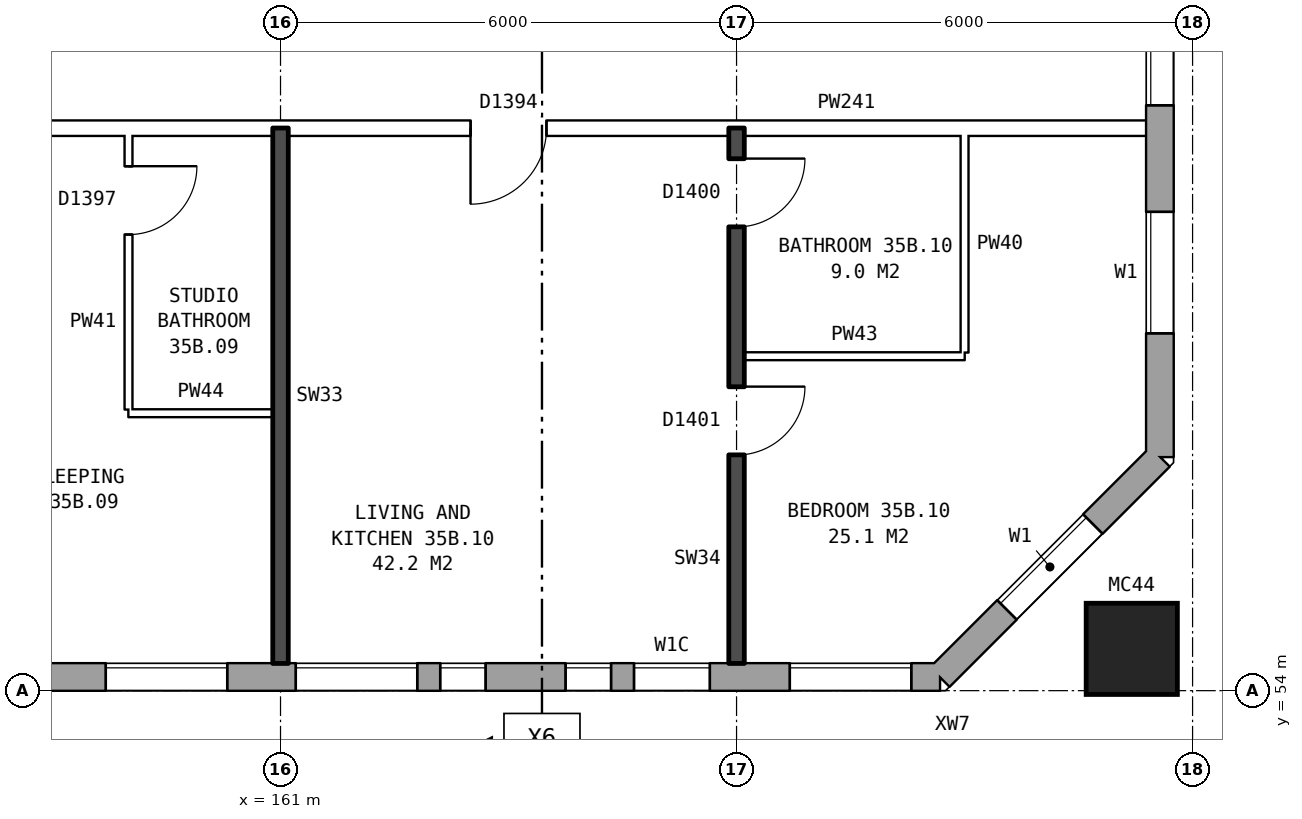
"""IFC4 building model, lengths in metres.
Left out: names, types, materials, properties, quantities, classifications, styles, units other than length and angle.
Written with IfcOpenShell. Run it as: python <this file> out.ifc"""

import sys

from ifc_helpers import new_model, si_unit, direction, frame, frame_2d, origin, origin_2d, place, context, subcontext, project, spatial, rectangle, hollow_rectangle, extrude, element, fill, save


model = new_model("IFC4")
c1 = context("Model", 3, precision=1e-05, world=origin(), true_north=direction((0.0, 1.0)))
c2 = subcontext(c1, "Body", "Model", "MODEL_VIEW")
j1 = project(units=[si_unit("LENGTHUNIT", "METRE"), si_unit("PLANEANGLEUNIT", "RADIAN")], contexts=[c1])
p1 = place(None, origin())
s1 = spatial("IfcSite", under=j1, at=p1, CompositionType="ELEMENT")
p2 = place(p1, origin())
s2 = spatial("IfcBuilding", under=s1, at=p2, CompositionType="ELEMENT")
p3 = place(p2, frame((0.0, 0.0, 126.8)))
s3 = spatial("IfcBuildingStorey", under=s2, at=p3, CompositionType="ELEMENT", Elevation=126.8)
p4 = place(p3, frame((172.2, 54.55, 0.0), z_axis=(0.0, 0.0, 1.0), x_axis=(1.0, 0.0, 0.0)))
e1 = element("IfcColumn", 1, at=p4, inside=s3, PredefinedType="COLUMN", context=c2, shape_type="SweptSolid", body=[
    extrude(hollow_rectangle(XDim=1.2, YDim=1.2, WallThickness=0.065, at=origin_2d()), origin(), (0.0, 0.0, 1.0), 3.1),
])
p5 = place(p3, frame((134.075, 54.18, 0.0), z_axis=(0.0, 0.0, 1.0), x_axis=(1.0, 0.0, 0.0)))
e2 = element("IfcWall", 2, at=p5, inside=s3, PredefinedType="STANDARD", context=c2, shape_type="SweptSolid", body=[
    extrude(rectangle(XDim=35.601, YDim=0.36, at=frame_2d((17.8, 0.0))), origin(), (0.0, 0.0, 1.0), 2.85),
])
p6 = place(p5, frame((0.625, 0.0, 0.8)))
e3 = element("IfcOpeningElement", 3, at=p6, cuts=e2, PredefinedType="OPENING", context=c2, shape_type="SweptSolid", body=[
    extrude(rectangle(XDim=1.6, YDim=1.8, at=frame_2d((0.8, 0.9))), frame((0.0, 0.19, 0.0), z_axis=(0.0, -1.0, 0.0), x_axis=(1.0, 0.0, 0.0)), (0.0, 0.0, 1.0), 0.38),
])
p7 = place(p5, frame((3.125, 0.0, 0.8)))
e4 = element("IfcOpeningElement", 4, at=p7, cuts=e2, PredefinedType="OPENING", context=c2, shape_type="SweptSolid", body=[
    extrude(rectangle(XDim=0.8, YDim=1.8, at=frame_2d((0.4, 0.9))), frame((0.0, 0.19, 0.0), z_axis=(0.0, -1.0, 0.0), x_axis=(1.0, 0.0, 0.0)), (0.0, 0.0, 1.0), 0.38),
])
p8 = place(p5, frame((6.625, 0.0, 0.8)))
e5 = element("IfcOpeningElement", 5, at=p8, cuts=e2, PredefinedType="OPENING", context=c2, shape_type="SweptSolid", body=[
    extrude(rectangle(XDim=1.6, YDim=1.8, at=frame_2d((0.8, 0.9))), frame((0.0, 0.19, 0.0), z_axis=(0.0, -1.0, 0.0), x_axis=(1.0, 0.0, 0.0)), (0.0, 0.0, 1.0), 0.38),
])
p9 = place(p5, frame((9.625, 0.0, 0.8)))
e6 = element("IfcOpeningElement", 6, at=p9, cuts=e2, PredefinedType="OPENING", context=c2, shape_type="SweptSolid", body=[
    extrude(rectangle(XDim=1.6, YDim=1.8, at=frame_2d((0.8, 0.9))), frame((0.0, 0.19, 0.0), z_axis=(0.0, -1.0, 0.0), x_axis=(1.0, 0.0, 0.0)), (0.0, 0.0, 1.0), 0.38),
])
p10 = place(p5, frame((12.625, 0.0, 0.8)))
e7 = element("IfcOpeningElement", 7, at=p10, cuts=e2, PredefinedType="OPENING", context=c2, shape_type="SweptSolid", body=[
    extrude(rectangle(XDim=1.6, YDim=1.8, at=frame_2d((0.8, 0.9))), frame((0.0, 0.19, 0.0), z_axis=(0.0, -1.0, 0.0), x_axis=(1.0, 0.0, 0.0)), (0.0, 0.0, 1.0), 0.38),
])
p11 = place(p5, frame((15.625, 0.0, 0.8)))
e8 = element("IfcOpeningElement", 8, at=p11, cuts=e2, PredefinedType="OPENING", context=c2, shape_type="SweptSolid", body=[
    extrude(rectangle(XDim=1.6, YDim=1.8, at=frame_2d((0.8, 0.9))), frame((0.0, 0.19, 0.0), z_axis=(0.0, -1.0, 0.0), x_axis=(1.0, 0.0, 0.0)), (0.0, 0.0, 1.0), 0.38),
])
p12 = place(p5, frame((18.625, 0.0, 0.8)))
e9 = element("IfcOpeningElement", 9, at=p12, cuts=e2, PredefinedType="OPENING", context=c2, shape_type="SweptSolid", body=[
    extrude(rectangle(XDim=1.6, YDim=1.8, at=frame_2d((0.8, 0.9))), frame((0.0, 0.19, 0.0), z_axis=(0.0, -1.0, 0.0), x_axis=(1.0, 0.0, 0.0)), (0.0, 0.0, 1.0), 0.38),
])
p13 = place(p5, frame((21.625, 0.0, 0.8)))
e10 = element("IfcOpeningElement", 10, at=p13, cuts=e2, PredefinedType="OPENING", context=c2, shape_type="SweptSolid", body=[
    extrude(rectangle(XDim=1.6, YDim=1.8, at=frame_2d((0.8, 0.9))), frame((0.0, 0.19, 0.0), z_axis=(0.0, -1.0, 0.0), x_axis=(1.0, 0.0, 0.0)), (0.0, 0.0, 1.0), 0.38),
])
p14 = place(p5, frame((24.625, 0.0, 0.8)))
e11 = element("IfcOpeningElement", 11, at=p14, cuts=e2, PredefinedType="OPENING", context=c2, shape_type="SweptSolid", body=[
    extrude(rectangle(XDim=1.6, YDim=1.8, at=frame_2d((0.8, 0.9))), frame((0.0, 0.19, 0.0), z_axis=(0.0, -1.0, 0.0), x_axis=(1.0, 0.0, 0.0)), (0.0, 0.0, 1.0), 0.38),
])
p15 = place(p5, frame((27.125, 0.0, 0.8)))
e12 = element("IfcOpeningElement", 12, at=p15, cuts=e2, PredefinedType="OPENING", context=c2, shape_type="SweptSolid", body=[
    extrude(rectangle(XDim=1.6, YDim=1.8, at=frame_2d((0.8, 0.9))), frame((0.0, 0.19, 0.0), z_axis=(0.0, -1.0, 0.0), x_axis=(1.0, 0.0, 0.0)), (0.0, 0.0, 1.0), 0.38),
])
p16 = place(p5, frame((29.025, 0.0, 0.8)))
e13 = element("IfcOpeningElement", 13, at=p16, cuts=e2, PredefinedType="OPENING", context=c2, shape_type="SweptSolid", body=[
    extrude(rectangle(XDim=0.6, YDim=0.9, at=frame_2d((0.3, 0.45))), frame((0.0, 0.19, 0.0), z_axis=(0.0, -1.0, 0.0), x_axis=(1.0, 0.0, 0.0)), (0.0, 0.0, 1.0), 0.38),
])
p17 = place(p5, frame((33.625, 0.0, 0.8)))
e14 = element("IfcOpeningElement", 14, at=p17, cuts=e2, PredefinedType="OPENING", context=c2, shape_type="SweptSolid", body=[
    extrude(rectangle(XDim=1.6, YDim=1.8, at=frame_2d((0.8, 0.9))), frame((0.0, 0.19, 0.0), z_axis=(0.0, -1.0, 0.0), x_axis=(1.0, 0.0, 0.0)), (0.0, 0.0, 1.0), 0.38),
])
p18 = place(p5, frame((4.225, 0.0, 1.6)))
e15 = element("IfcOpeningElement", 15, at=p18, cuts=e2, PredefinedType="OPENING", context=c2, shape_type="SweptSolid", body=[
    extrude(rectangle(XDim=0.6, YDim=0.9, at=frame_2d((0.3, 0.45))), frame((0.0, 0.19, 0.0), z_axis=(0.0, -1.0, 0.0), x_axis=(1.0, 0.0, 0.0)), (0.0, 0.0, 1.0), 0.38),
])
p19 = place(p5, frame((30.675, 0.0, 1.7)))
e16 = element("IfcOpeningElement", 16, at=p19, cuts=e2, PredefinedType="OPENING", context=c2, shape_type="SweptSolid", body=[
    extrude(rectangle(XDim=0.6, YDim=0.9, at=frame_2d((0.3, 0.45))), frame((0.0, 0.19, 0.0), z_axis=(0.0, -1.0, 0.0), x_axis=(1.0, 0.0, 0.0)), (0.0, 0.0, 1.0), 0.38),
])
p20 = place(p5, frame((31.575, 0.0, 0.8)))
e17 = element("IfcOpeningElement", 17, at=p20, cuts=e2, PredefinedType="OPENING", context=c2, shape_type="SweptSolid", body=[
    extrude(rectangle(XDim=1.0, YDim=1.8, at=frame_2d((0.5, 0.9))), frame((0.0, 0.19, 0.0), z_axis=(0.0, -1.0, 0.0), x_axis=(1.0, 0.0, 0.0)), (0.0, 0.0, 1.0), 0.38),
])
p21 = place(p3, frame((169.675, 54.18, 0.0), z_axis=(0.0, 0.0, 1.0), x_axis=(0.707106781187, 0.707106781187, 0.0)))
e18 = element("IfcWall", 18, at=p21, inside=s3, PredefinedType="STANDARD", context=c2, shape_type="SweptSolid", body=[
    extrude(rectangle(XDim=4.094, YDim=0.36, at=frame_2d((2.047, 0.0))), origin(), (0.0, 0.0, 1.0), 2.85),
])
p22 = place(p21, frame((1.247, 0.0, 0.8)))
e19 = element("IfcOpeningElement", 19, at=p22, cuts=e18, PredefinedType="OPENING", context=c2, shape_type="SweptSolid", body=[
    extrude(rectangle(XDim=1.6, YDim=1.8, at=frame_2d((0.8, 0.9))), frame((0.0, 0.19, 0.0), z_axis=(0.0, -1.0, 0.0), x_axis=(1.0, 0.0, 0.0)), (0.0, 0.0, 1.0), 0.38),
])
p23 = place(p3, frame((172.57, 57.075, 0.0), z_axis=(0.0, 0.0, 1.0), x_axis=(0.0, 1.0, 0.0)))
e20 = element("IfcWall", 20, at=p23, inside=s3, PredefinedType="STANDARD", context=c2, shape_type="SweptSolid", body=[
    extrude(rectangle(XDim=25.851, YDim=0.36, at=frame_2d((12.925, 0.0))), origin(), (0.0, 0.0, 1.0), 2.85),
])
p24 = place(p23, frame((1.625, 0.0, 0.8)))
e21 = element("IfcOpeningElement", 21, at=p24, cuts=e20, PredefinedType="OPENING", context=c2, shape_type="SweptSolid", body=[
    extrude(rectangle(XDim=1.6, YDim=1.8, at=frame_2d((0.8, 0.9))), frame((0.0, 0.19, 0.0), z_axis=(0.0, -1.0, 0.0), x_axis=(1.0, 0.0, 0.0)), (0.0, 0.0, 1.0), 0.38),
])
p25 = place(p23, frame((4.625, 0.0, 0.8)))
e22 = element("IfcOpeningElement", 22, at=p25, cuts=e20, PredefinedType="OPENING", context=c2, shape_type="SweptSolid", body=[
    extrude(rectangle(XDim=1.6, YDim=1.8, at=frame_2d((0.8, 0.9))), frame((0.0, 0.19, 0.0), z_axis=(0.0, -1.0, 0.0), x_axis=(1.0, 0.0, 0.0)), (0.0, 0.0, 1.0), 0.38),
])
p26 = place(p23, frame((6.525, 0.0, 0.8)))
e23 = element("IfcOpeningElement", 23, at=p26, cuts=e20, PredefinedType="OPENING", context=c2, shape_type="SweptSolid", body=[
    extrude(rectangle(XDim=1.2, YDim=1.8, at=frame_2d((0.6, 0.9))), frame((0.0, 0.19, 0.0), z_axis=(0.0, -1.0, 0.0), x_axis=(1.0, 0.0, 0.0)), (0.0, 0.0, 1.0), 0.38),
])
p27 = place(p23, frame((8.025, 0.0, 1.6)))
e24 = element("IfcOpeningElement", 24, at=p27, cuts=e20, PredefinedType="OPENING", context=c2, shape_type="SweptSolid", body=[
    extrude(rectangle(XDim=1.0, YDim=0.9, at=frame_2d((0.5, 0.45))), frame((0.0, 0.19, 0.0), z_axis=(0.0, -1.0, 0.0), x_axis=(1.0, 0.0, 0.0)), (0.0, 0.0, 1.0), 0.38),
])
p28 = place(p23, frame((10.075, 0.0, 0.8)))
e25 = element("IfcOpeningElement", 25, at=p28, cuts=e20, PredefinedType="OPENING", context=c2, shape_type="SweptSolid", body=[
    extrude(rectangle(XDim=1.0, YDim=0.9, at=frame_2d((0.5, 0.45))), frame((0.0, 0.19, 0.0), z_axis=(0.0, -1.0, 0.0), x_axis=(1.0, 0.0, 0.0)), (0.0, 0.0, 1.0), 0.38),
])
p29 = place(p23, frame((11.375, 0.0, 0.8)))
e26 = element("IfcOpeningElement", 26, at=p29, cuts=e20, PredefinedType="OPENING", context=c2, shape_type="SweptSolid", body=[
    extrude(rectangle(XDim=1.2, YDim=1.8, at=frame_2d((0.6, 0.9))), frame((0.0, 0.19, 0.0), z_axis=(0.0, -1.0, 0.0), x_axis=(1.0, 0.0, 0.0)), (0.0, 0.0, 1.0), 0.38),
])
p30 = place(p23, frame((19.625, 0.0, 0.8)))
e27 = element("IfcOpeningElement", 27, at=p30, cuts=e20, PredefinedType="OPENING", context=c2, shape_type="SweptSolid", body=[
    extrude(rectangle(XDim=1.6, YDim=1.8, at=frame_2d((0.8, 0.9))), frame((0.0, 0.19, 0.0), z_axis=(0.0, -1.0, 0.0), x_axis=(1.0, 0.0, 0.0)), (0.0, 0.0, 1.0), 0.38),
])
p31 = place(p23, frame((22.625, 0.0, 0.8)))
e28 = element("IfcOpeningElement", 28, at=p31, cuts=e20, PredefinedType="OPENING", context=c2, shape_type="SweptSolid", body=[
    extrude(rectangle(XDim=1.6, YDim=1.8, at=frame_2d((0.8, 0.9))), frame((0.0, 0.19, 0.0), z_axis=(0.0, -1.0, 0.0), x_axis=(1.0, 0.0, 0.0)), (0.0, 0.0, 1.0), 0.38),
])
p32 = place(p23, frame((12.875, 0.0, 0.8)))
e29 = element("IfcOpeningElement", 29, at=p32, cuts=e20, PredefinedType="OPENING", context=c2, shape_type="SweptSolid", body=[
    extrude(rectangle(XDim=1.6, YDim=1.8, at=frame_2d((0.8, 0.9))), frame((0.0, 0.19, 0.0), z_axis=(0.0, -1.0, 0.0), x_axis=(1.0, 0.0, 0.0)), (0.0, 0.0, 1.0), 0.38),
])
p33 = place(p23, frame((14.775, 0.0, 0.8)))
e30 = element("IfcOpeningElement", 30, at=p33, cuts=e20, PredefinedType="OPENING", context=c2, shape_type="SweptSolid", body=[
    extrude(rectangle(XDim=1.0, YDim=0.9, at=frame_2d((0.5, 0.45))), frame((0.0, 0.19, 0.0), z_axis=(0.0, -1.0, 0.0), x_axis=(1.0, 0.0, 0.0)), (0.0, 0.0, 1.0), 0.38),
])
p34 = place(p23, frame((16.675, 0.0, 1.7)))
e31 = element("IfcOpeningElement", 31, at=p34, cuts=e20, PredefinedType="OPENING", context=c2, shape_type="SweptSolid", body=[
    extrude(rectangle(XDim=1.0, YDim=0.9, at=frame_2d((0.5, 0.45))), frame((0.0, 0.19, 0.0), z_axis=(0.0, -1.0, 0.0), x_axis=(1.0, 0.0, 0.0)), (0.0, 0.0, 1.0), 0.38),
])
p35 = place(p23, frame((17.975, 0.0, 0.8)))
e32 = element("IfcOpeningElement", 32, at=p35, cuts=e20, PredefinedType="OPENING", context=c2, shape_type="SweptSolid", body=[
    extrude(rectangle(XDim=1.2, YDim=1.8, at=frame_2d((0.6, 0.9))), frame((0.0, 0.19, 0.0), z_axis=(0.0, -1.0, 0.0), x_axis=(1.0, 0.0, 0.0)), (0.0, 0.0, 1.0), 0.38),
])
p36 = place(p3, frame((159.0, 57.65, 0.0), z_axis=(0.0, 0.0, 1.0), x_axis=(1.0, 0.0, 0.0)))
e33 = element("IfcWall", 33, at=p36, inside=s3, PredefinedType="PARTITIONING", context=c2, shape_type="SweptSolid", body=[
    extrude(rectangle(XDim=1.9, YDim=0.1, at=frame_2d((0.95, 0.0))), origin(), (0.0, 0.0, 1.0), 2.85),
])
p37 = place(p3, frame((167.1, 58.4, 0.0), z_axis=(0.0, 0.0, 1.0), x_axis=(1.0, 0.0, 0.0)))
e34 = element("IfcWall", 34, at=p37, inside=s3, PredefinedType="PARTITIONING", context=c2, shape_type="SweptSolid", body=[
    extrude(rectangle(XDim=2.9, YDim=0.1, at=frame_2d((1.45, 0.0))), origin(), (0.0, 0.0, 1.0), 2.85),
])
p38 = place(p3, frame((155.1, 61.4, 0.0), z_axis=(0.0, 0.0, 1.0), x_axis=(1.0, 0.0, 0.0)))
e35 = element("IfcWall", 35, at=p38, inside=s3, PredefinedType="PARTITIONING", context=c2, shape_type="SweptSolid", body=[
    extrude(rectangle(XDim=17.29, YDim=0.2, at=frame_2d((8.645, 0.0))), origin(), (0.0, 0.0, 1.0), 2.85),
])
p39 = place(p38, frame((1.45, 0.0, 0.0)))
e36 = element("IfcOpeningElement", 36, at=p39, cuts=e35, PredefinedType="OPENING", context=c2, shape_type="SweptSolid", body=[
    extrude(rectangle(XDim=1.0, YDim=2.1, at=frame_2d((0.5, 1.05))), frame((0.0, 0.11, 0.0), z_axis=(0.0, -1.0, 0.0), x_axis=(1.0, 0.0, 0.0)), (0.0, 0.0, 1.0), 0.22),
])
p40 = place(p38, frame((8.4, 0.0, 0.0)))
e37 = element("IfcOpeningElement", 37, at=p40, cuts=e35, PredefinedType="OPENING", context=c2, shape_type="SweptSolid", body=[
    extrude(rectangle(XDim=1.0, YDim=2.1, at=frame_2d((0.5, 1.05))), frame((0.0, 0.11, 0.0), z_axis=(0.0, -1.0, 0.0), x_axis=(1.0, 0.0, 0.0)), (0.0, 0.0, 1.0), 0.22),
])
p41 = place(p3, frame((159.0, 57.7, 0.0), z_axis=(0.0, 0.0, 1.0), x_axis=(0.0, 1.0, 0.0)))
e38 = element("IfcWall", 38, at=p41, inside=s3, PredefinedType="PARTITIONING", context=c2, shape_type="SweptSolid", body=[
    extrude(rectangle(XDim=3.6, YDim=0.1, at=frame_2d((1.8, 0.0))), origin(), (0.0, 0.0, 1.0), 2.85),
])
p42 = place(p41, frame((2.3, 0.0, 0.0)))
e39 = element("IfcOpeningElement", 39, at=p42, cuts=e38, PredefinedType="OPENING", context=c2, shape_type="SweptSolid", body=[
    extrude(rectangle(XDim=0.9, YDim=2.1, at=frame_2d((0.45, 1.05))), frame((0.0, 0.06, 0.0), z_axis=(0.0, -1.0, 0.0), x_axis=(1.0, 0.0, 0.0)), (0.0, 0.0, 1.0), 0.12),
])
p43 = place(p3, frame((161.0, 54.36, 0.0), z_axis=(0.0, 0.0, 1.0), x_axis=(0.0, 1.0, 0.0)))
e40 = element("IfcWall", 40, at=p43, inside=s3, PredefinedType="SOLIDWALL", context=c2, shape_type="SweptSolid", body=[
    extrude(rectangle(XDim=7.04, YDim=0.2, at=frame_2d((3.52, 0.0))), origin(), (0.0, 0.0, 1.0), 2.85),
])
p44 = place(p3, frame((167.0, 54.36, 0.0), z_axis=(0.0, 0.0, 1.0), x_axis=(0.0, 1.0, 0.0)))
e41 = element("IfcWall", 41, at=p44, inside=s3, PredefinedType="SOLIDWALL", context=c2, shape_type="SweptSolid", body=[
    extrude(rectangle(XDim=7.04, YDim=0.2, at=frame_2d((3.52, 0.0))), origin(), (0.0, 0.0, 1.0), 2.85),
])
p45 = place(p44, frame((2.74, 0.0, 0.0)))
e42 = element("IfcOpeningElement", 42, at=p45, cuts=e41, PredefinedType="OPENING", context=c2, shape_type="SweptSolid", body=[
    extrude(rectangle(XDim=0.9, YDim=2.1, at=frame_2d((0.45, 1.05))), frame((0.0, 0.11, 0.0), z_axis=(0.0, -1.0, 0.0), x_axis=(1.0, 0.0, 0.0)), (0.0, 0.0, 1.0), 0.22),
])
p46 = place(p44, frame((5.74, 0.0, 0.0)))
e43 = element("IfcOpeningElement", 43, at=p46, cuts=e41, PredefinedType="OPENING", context=c2, shape_type="SweptSolid", body=[
    extrude(rectangle(XDim=0.9, YDim=2.1, at=frame_2d((0.45, 1.05))), frame((0.0, 0.11, 0.0), z_axis=(0.0, -1.0, 0.0), x_axis=(1.0, 0.0, 0.0)), (0.0, 0.0, 1.0), 0.22),
])
p47 = place(p3, frame((170.0, 58.45, 0.0), z_axis=(0.0, 0.0, 1.0), x_axis=(0.0, 1.0, 0.0)))
e44 = element("IfcWall", 44, at=p47, inside=s3, PredefinedType="PARTITIONING", context=c2, shape_type="SweptSolid", body=[
    extrude(rectangle(XDim=2.85, YDim=0.1, at=frame_2d((1.425, 0.0))), origin(), (0.0, 0.0, 1.0), 2.85),
])
p48 = place(p14, origin())
e45 = element("IfcWindow", 45, at=p48, inside=s3, PartitioningType="SINGLE_PANEL", PredefinedType="WINDOW", context=c2, shape_type="SweptSolid", body=[
    extrude(rectangle(XDim=1.6, YDim=1.8, at=frame_2d((0.8, 0.9))), frame((0.0, 0.15, 0.0), z_axis=(0.0, -1.0, 0.0), x_axis=(1.0, 0.0, 0.0)), (0.0, 0.0, 1.0), 0.06),
])
fill(e11, e45)
p49 = place(p15, origin())
e46 = element("IfcWindow", 46, at=p49, inside=s3, PartitioningType="SINGLE_PANEL", PredefinedType="WINDOW", context=c2, shape_type="SweptSolid", body=[
    extrude(rectangle(XDim=1.6, YDim=1.8, at=frame_2d((0.8, 0.9))), frame((0.0, 0.15, 0.0), z_axis=(0.0, -1.0, 0.0), x_axis=(1.0, 0.0, 0.0)), (0.0, 0.0, 1.0), 0.06),
])
fill(e12, e46)
p50 = place(p16, origin())
e47 = element("IfcWindow", 47, at=p50, inside=s3, PartitioningType="SINGLE_PANEL", PredefinedType="WINDOW", context=c2, shape_type="SweptSolid", body=[
    extrude(rectangle(XDim=0.6, YDim=0.9, at=frame_2d((0.3, 0.45))), frame((0.0, 0.15, 0.0), z_axis=(0.0, -1.0, 0.0), x_axis=(1.0, 0.0, 0.0)), (0.0, 0.0, 1.0), 0.06),
])
fill(e13, e47)
p51 = place(p17, origin())
e48 = element("IfcWindow", 48, at=p51, inside=s3, PartitioningType="SINGLE_PANEL", PredefinedType="WINDOW", context=c2, shape_type="SweptSolid", body=[
    extrude(rectangle(XDim=1.6, YDim=1.8, at=frame_2d((0.8, 0.9))), frame((0.0, 0.15, 0.0), z_axis=(0.0, -1.0, 0.0), x_axis=(1.0, 0.0, 0.0)), (0.0, 0.0, 1.0), 0.06),
])
fill(e14, e48)
p52 = place(p22, origin())
e49 = element("IfcWindow", 49, at=p52, inside=s3, PartitioningType="SINGLE_PANEL", PredefinedType="WINDOW", context=c2, shape_type="SweptSolid", body=[
    extrude(rectangle(XDim=1.6, YDim=1.8, at=frame_2d((0.8, 0.9))), frame((0.0, 0.15, 0.0), z_axis=(0.0, -1.0, 0.0), x_axis=(1.0, 0.0, 0.0)), (0.0, 0.0, 1.0), 0.06),
])
fill(e19, e49)
p53 = place(p24, origin())
e50 = element("IfcWindow", 50, at=p53, inside=s3, PartitioningType="SINGLE_PANEL", PredefinedType="WINDOW", context=c2, shape_type="SweptSolid", body=[
    extrude(rectangle(XDim=1.6, YDim=1.8, at=frame_2d((0.8, 0.9))), frame((0.0, 0.15, 0.0), z_axis=(0.0, -1.0, 0.0), x_axis=(1.0, 0.0, 0.0)), (0.0, 0.0, 1.0), 0.06),
])
fill(e21, e50)
p54 = place(p25, origin())
e51 = element("IfcWindow", 51, at=p54, inside=s3, PartitioningType="SINGLE_PANEL", PredefinedType="WINDOW", context=c2, shape_type="SweptSolid", body=[
    extrude(rectangle(XDim=1.6, YDim=1.8, at=frame_2d((0.8, 0.9))), frame((0.0, 0.15, 0.0), z_axis=(0.0, -1.0, 0.0), x_axis=(1.0, 0.0, 0.0)), (0.0, 0.0, 1.0), 0.06),
])
fill(e22, e51)
p55 = place(p42, frame((0.9, 0.0, 0.0), z_axis=(0.0, 0.0, 1.0), x_axis=(-1.0, 0.0, 0.0)))
e52 = element("IfcDoor", 52, at=p55, inside=s3, OperationType="SINGLE_SWING_LEFT", PredefinedType="DOOR", context=c2, shape_type="SweptSolid", body=[
    extrude(rectangle(XDim=0.9, YDim=2.1, at=frame_2d((0.45, 1.05))), frame((0.0, 0.025, 0.0), z_axis=(0.0, -1.0, 0.0), x_axis=(1.0, 0.0, 0.0)), (0.0, 0.0, 1.0), 0.05),
])
fill(e39, e52)
p56 = place(p45, frame((0.9, 0.0, 0.0), z_axis=(0.0, 0.0, 1.0), x_axis=(-1.0, 0.0, 0.0)))
e53 = element("IfcDoor", 53, at=p56, inside=s3, OperationType="SINGLE_SWING_LEFT", PredefinedType="DOOR", context=c2, shape_type="SweptSolid", body=[
    extrude(rectangle(XDim=0.9, YDim=2.1, at=frame_2d((0.45, 1.05))), frame((0.0, 0.025, 0.0), z_axis=(0.0, -1.0, 0.0), x_axis=(1.0, 0.0, 0.0)), (0.0, 0.0, 1.0), 0.05),
])
fill(e42, e53)
p57 = place(p40, frame((1.0, 0.0, 0.0), z_axis=(0.0, 0.0, 1.0), x_axis=(-1.0, 0.0, 0.0)))
e54 = element("IfcDoor", 54, at=p57, inside=s3, OperationType="SINGLE_SWING_RIGHT", PredefinedType="DOOR", context=c2, shape_type="SweptSolid", body=[
    extrude(rectangle(XDim=1.0, YDim=2.1, at=frame_2d((0.5, 1.05))), frame((0.0, 0.025, 0.0), z_axis=(0.0, -1.0, 0.0), x_axis=(1.0, 0.0, 0.0)), (0.0, 0.0, 1.0), 0.05),
])
fill(e37, e54)
p58 = place(p46, frame((0.9, 0.0, 0.0), z_axis=(0.0, 0.0, 1.0), x_axis=(-1.0, 0.0, 0.0)))
e55 = element("IfcDoor", 55, at=p58, inside=s3, OperationType="SINGLE_SWING_LEFT", PredefinedType="DOOR", context=c2, shape_type="SweptSolid", body=[
    extrude(rectangle(XDim=0.9, YDim=2.1, at=frame_2d((0.45, 1.05))), frame((0.0, 0.025, 0.0), z_axis=(0.0, -1.0, 0.0), x_axis=(1.0, 0.0, 0.0)), (0.0, 0.0, 1.0), 0.05),
])
fill(e43, e55)
p59 = place(p19, origin())
e56 = element("IfcWindow", 56, at=p59, inside=s3, PartitioningType="SINGLE_PANEL", PredefinedType="WINDOW", context=c2, shape_type="SweptSolid", body=[
    extrude(rectangle(XDim=0.6, YDim=0.9, at=frame_2d((0.3, 0.45))), frame((0.0, 0.15, 0.0), z_axis=(0.0, -1.0, 0.0), x_axis=(1.0, 0.0, 0.0)), (0.0, 0.0, 1.0), 0.06),
])
fill(e16, e56)
p60 = place(p20, origin())
e57 = element("IfcWindow", 57, at=p60, inside=s3, PartitioningType="SINGLE_PANEL", PredefinedType="WINDOW", context=c2, shape_type="SweptSolid", body=[
    extrude(rectangle(XDim=1.0, YDim=1.8, at=frame_2d((0.5, 0.9))), frame((0.0, 0.15, 0.0), z_axis=(0.0, -1.0, 0.0), x_axis=(1.0, 0.0, 0.0)), (0.0, 0.0, 1.0), 0.06),
])
fill(e17, e57)
save(model, sys.argv[1])
